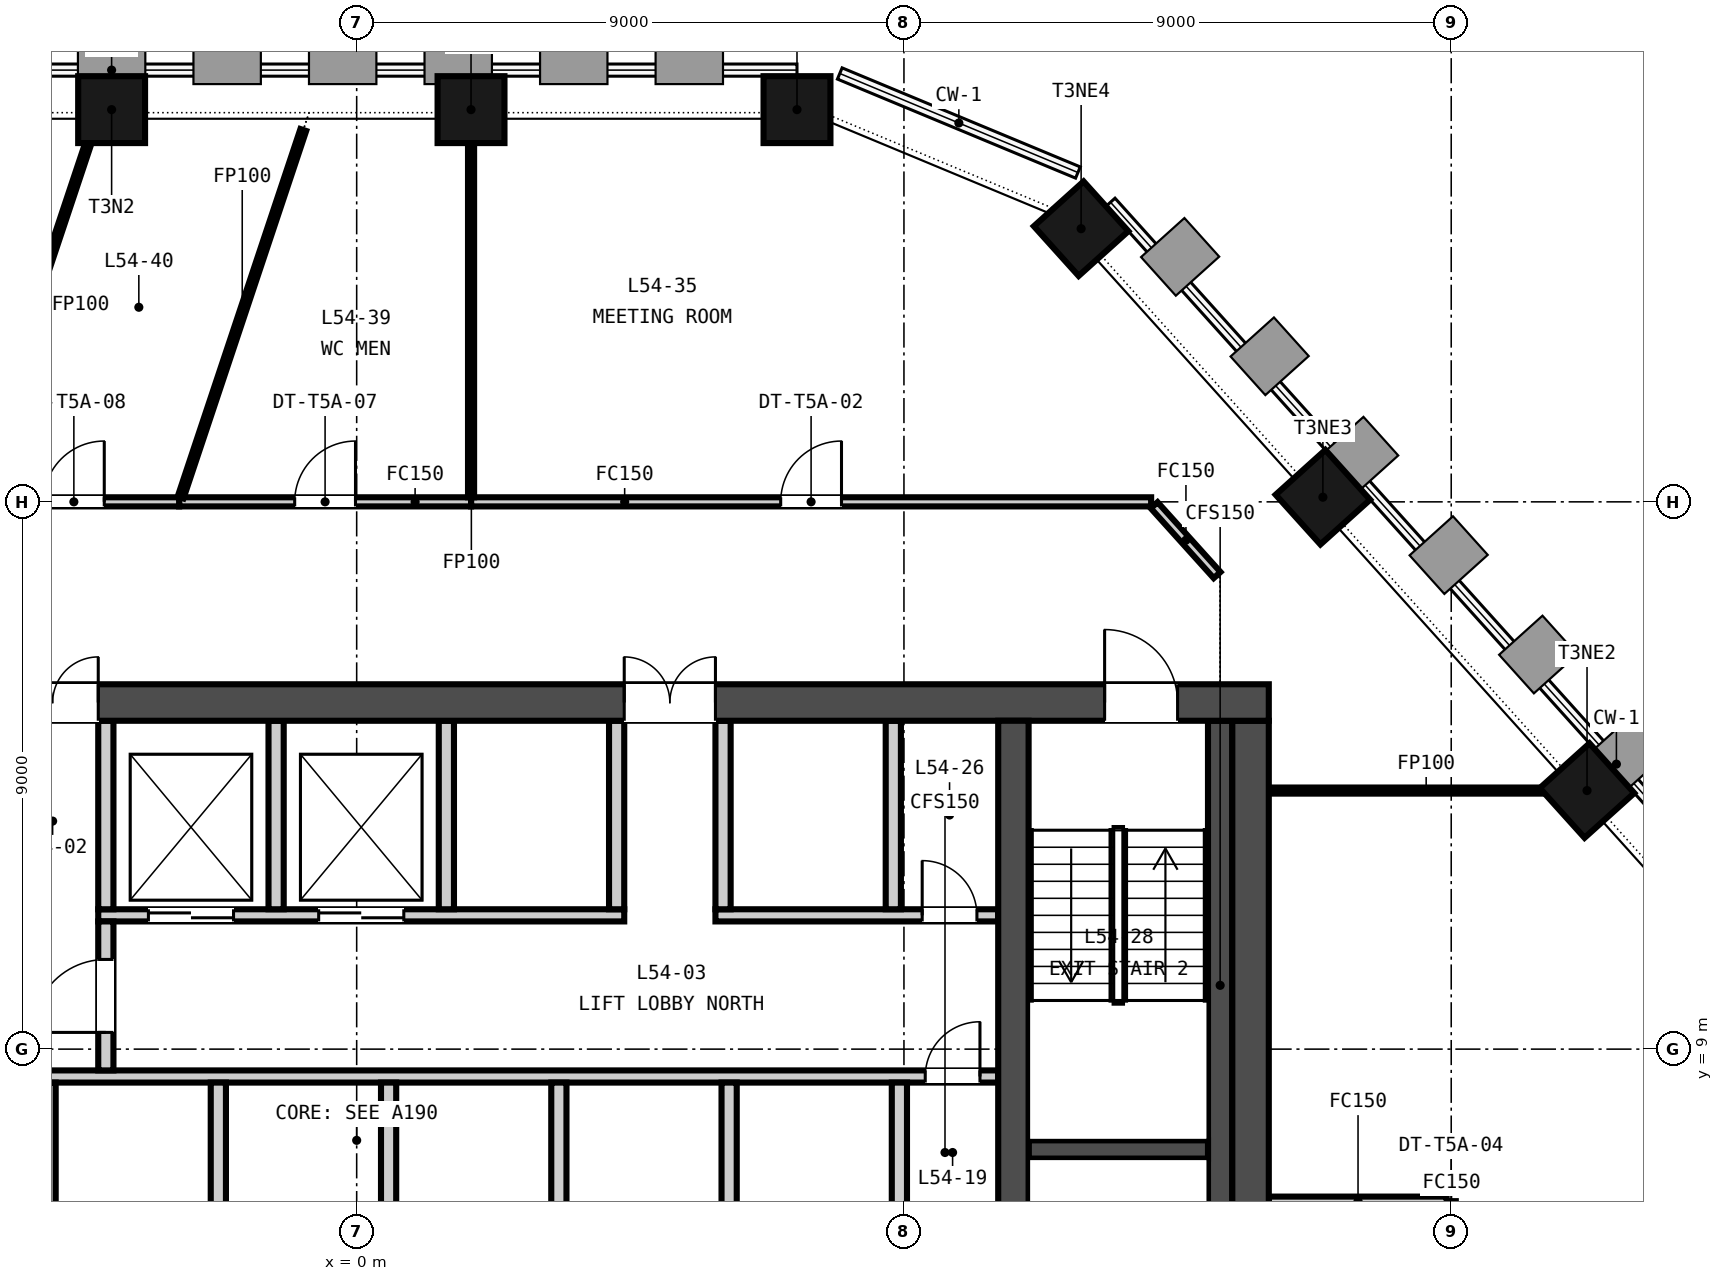
"""IFC4 building model, lengths in metres.
Left out: names, types, materials, properties, quantities, classifications, styles, units other than length and angle.
Written with IfcOpenShell. Run it as: python <this file> out.ifc"""

import sys

from ifc_helpers import new_model, si_unit, direction, frame, frame_2d, origin, origin_2d, place, context, subcontext, project, spatial, rectangle, extrude, element, fill, save


model = new_model("IFC4")
c1 = context("Model", 3, precision=1e-05, world=origin(), true_north=direction((0.0, 1.0)))
c2 = subcontext(c1, "Body", "Model", "MODEL_VIEW")
j1 = project(units=[si_unit("LENGTHUNIT", "METRE"), si_unit("PLANEANGLEUNIT", "RADIAN")], contexts=[c1])
p1 = place(None, origin())
s1 = spatial("IfcSite", under=j1, at=p1, CompositionType="ELEMENT")
p2 = place(p1, origin())
s2 = spatial("IfcBuilding", under=s1, at=p2, CompositionType="ELEMENT")
p3 = place(p2, frame((0.0, 0.0, 216.3)))
s3 = spatial("IfcBuildingStorey", under=s2, at=p3, CompositionType="ELEMENT", Elevation=216.3)
p4 = place(p3, frame((-15.0, 14.7, -0.15), z_axis=(0.0, 0.0, 1.0), x_axis=(1.0, 0.0, 0.0)))
e1 = element("IfcWall", 1, at=p4, inside=s3, PredefinedType="SOLIDWALL", context=c2, shape_type="SweptSolid", body=[
    extrude(rectangle(XDim=30.0, YDim=0.6, at=frame_2d((15.0, 0.0))), origin(), (0.0, 0.0, 1.0), 3.65),
])
p5 = place(p4, frame((9.25, 0.0, 0.15)))
e2 = element("IfcOpeningElement", 2, at=p5, cuts=e1, PredefinedType="OPENING", context=c2, shape_type="SweptSolid", body=[
    extrude(rectangle(XDim=1.5, YDim=2.1, at=frame_2d((0.75, 1.05))), frame((0.0, 0.31, 0.0), z_axis=(0.0, -1.0, 0.0), x_axis=(1.0, 0.0, 0.0)), (0.0, 0.0, 1.0), 0.62),
])
p6 = place(p4, frame((19.4, 0.0, 0.15)))
e3 = element("IfcOpeningElement", 3, at=p6, cuts=e1, PredefinedType="OPENING", context=c2, shape_type="SweptSolid", body=[
    extrude(rectangle(XDim=1.5, YDim=2.1, at=frame_2d((0.75, 1.05))), frame((0.0, 0.31, 0.0), z_axis=(0.0, -1.0, 0.0), x_axis=(1.0, 0.0, 0.0)), (0.0, 0.0, 1.0), 0.62),
])
p7 = place(p4, frame((1.5, 0.0, 0.15)))
e4 = element("IfcOpeningElement", 4, at=p7, cuts=e1, PredefinedType="OPENING", context=c2, shape_type="SweptSolid", body=[
    extrude(rectangle(XDim=1.2, YDim=2.1, at=frame_2d((0.6, 1.05))), frame((0.0, 0.31, 0.0), z_axis=(0.0, -1.0, 0.0), x_axis=(1.0, 0.0, 0.0)), (0.0, 0.0, 1.0), 0.62),
])
p8 = place(p4, frame((27.3, 0.0, 0.15)))
e5 = element("IfcOpeningElement", 5, at=p8, cuts=e1, PredefinedType="OPENING", context=c2, shape_type="SweptSolid", body=[
    extrude(rectangle(XDim=1.2, YDim=2.1, at=frame_2d((0.6, 1.05))), frame((0.0, 0.31, 0.0), z_axis=(0.0, -1.0, 0.0), x_axis=(1.0, 0.0, 0.0)), (0.0, 0.0, 1.0), 0.62),
])
p9 = place(p3, frame((14.7, 0.6, -0.15), z_axis=(0.0, 0.0, 1.0), x_axis=(0.0, 1.0, 0.0)))
e6 = element("IfcWall", 6, at=p9, inside=s3, PredefinedType="SOLIDWALL", context=c2, shape_type="SweptSolid", body=[
    extrude(rectangle(XDim=13.8, YDim=0.6, at=frame_2d((6.9, 0.0))), origin(), (0.0, 0.0, 1.0), 3.65),
])
p10 = place(p3, frame((10.8, 0.6, -0.15), z_axis=(0.0, 0.0, 1.0), x_axis=(0.0, 1.0, 0.0)))
e7 = element("IfcWall", 7, at=p10, inside=s3, PredefinedType="SOLIDWALL", context=c2, shape_type="SweptSolid", body=[
    extrude(rectangle(XDim=13.8, YDim=0.5, at=frame_2d((6.9, 0.0))), origin(), (0.0, 0.0, 1.0), 3.65),
])
for number, where, z_axis, x_axis in (
    (8, (7.241, 24.45, -0.15), (0.0, 0.0, 1.0), (-1.0, 0.0, 0.0)),
    (9, (1.881, 24.45, -0.15), (0.0, 0.0, 1.0), (-1.0, 0.0, 0.0)),
    (10, (-4.03, 24.45, -0.15), (0.0, 0.0, 1.0), (-1.0, 0.0, 0.0)),
    (11, (20.233, 13.252, -0.15), (0.0, 0.0, 1.0), (-0.669, 0.743, 0.0)),
    (12, (15.89, 18.076, -0.15), (0.0, 0.0, 1.0), (-0.669, 0.743, 0.0)),
    (13, (11.914, 22.492, -0.15), (0.0, 0.0, 1.0), (-0.669, 0.743, 0.0)),
):
    element("IfcColumn", number, at=place(p3, frame(where, z_axis=z_axis, x_axis=x_axis)), inside=s3, PredefinedType="COLUMN", context=c2, shape_type="SweptSolid", body=[
        extrude(rectangle(XDim=1.1, YDim=1.1, at=origin_2d()), origin(), (0.0, 0.0, 1.0), 3.65),
    ])
p11 = place(p3, frame((-10.55, 8.55, 0.0), z_axis=(0.0, 0.0, 1.0), x_axis=(1.0, 0.0, 0.0)))
e14 = element("IfcWall", 14, at=p11, inside=s3, PredefinedType="PARTITIONING", context=c2, shape_type="SweptSolid", body=[
    extrude(rectangle(XDim=21.1, YDim=0.2, at=frame_2d((10.55, 0.0))), origin(), (0.0, 0.0, 1.0), 3.5),
])
p12 = place(p11, frame((19.9, 0.0, 0.0)))
e15 = element("IfcOpeningElement", 15, at=p12, cuts=e14, PredefinedType="OPENING", context=c2, shape_type="SweptSolid", body=[
    extrude(rectangle(XDim=0.9, YDim=2.1, at=frame_2d((0.45, 1.05))), frame((0.0, 0.11, 0.0), z_axis=(0.0, -1.0, 0.0), x_axis=(1.0, 0.0, 0.0)), (0.0, 0.0, 1.0), 0.22),
])
p13 = place(p3, frame((-4.25, 11.2, 0.0), z_axis=(0.0, 0.0, 1.0), x_axis=(1.0, 0.0, 0.0)))
e16 = element("IfcWall", 16, at=p13, inside=s3, PredefinedType="PARTITIONING", context=c2, shape_type="SweptSolid", body=[
    extrude(rectangle(XDim=8.65, YDim=0.2, at=frame_2d((4.325, 0.0))), origin(), (0.0, 0.0, 1.0), 3.5),
])
p14 = place(p13, frame((0.825, 0.0, 0.0)))
e17 = element("IfcOpeningElement", 17, at=p14, cuts=e16, PredefinedType="OPENING", context=c2, shape_type="SweptSolid", body=[
    extrude(rectangle(XDim=1.4, YDim=2.1, at=frame_2d((0.7, 1.05))), frame((0.0, 0.11, 0.0), z_axis=(0.0, -1.0, 0.0), x_axis=(1.0, 0.0, 0.0)), (0.0, 0.0, 1.0), 0.22),
])
p15 = place(p13, frame((3.625, 0.0, 0.0)))
e18 = element("IfcOpeningElement", 18, at=p15, cuts=e16, PredefinedType="OPENING", context=c2, shape_type="SweptSolid", body=[
    extrude(rectangle(XDim=1.4, YDim=2.1, at=frame_2d((0.7, 1.05))), frame((0.0, 0.11, 0.0), z_axis=(0.0, -1.0, 0.0), x_axis=(1.0, 0.0, 0.0)), (0.0, 0.0, 1.0), 0.22),
])
p16 = place(p3, frame((5.9, 11.2, 0.0), z_axis=(0.0, 0.0, 1.0), x_axis=(1.0, 0.0, 0.0)))
e19 = element("IfcWall", 19, at=p16, inside=s3, PredefinedType="PARTITIONING", context=c2, shape_type="SweptSolid", body=[
    extrude(rectangle(XDim=4.65, YDim=0.2, at=frame_2d((2.325, 0.0))), origin(), (0.0, 0.0, 1.0), 3.5),
])
p17 = place(p16, frame((3.4, 0.0, 0.0)))
e20 = element("IfcOpeningElement", 20, at=p17, cuts=e19, PredefinedType="OPENING", context=c2, shape_type="SweptSolid", body=[
    extrude(rectangle(XDim=0.9, YDim=2.1, at=frame_2d((0.45, 1.05))), frame((0.0, 0.11, 0.0), z_axis=(0.0, -1.0, 0.0), x_axis=(1.0, 0.0, 0.0)), (0.0, 0.0, 1.0), 0.22),
])
p18 = place(p3, frame((-4.125, 8.65, 0.0), z_axis=(0.0, 0.0, 1.0), x_axis=(0.0, 1.0, 0.0)))
e21 = element("IfcWall", 21, at=p18, inside=s3, PredefinedType="PARTITIONING", context=c2, shape_type="SweptSolid", body=[
    extrude(rectangle(XDim=2.45, YDim=0.25, at=frame_2d((1.225, 0.0))), origin(), (0.0, 0.0, 1.0), 3.5),
])
p19 = place(p18, frame((0.625, 0.0, 0.0)))
e22 = element("IfcOpeningElement", 22, at=p19, cuts=e21, PredefinedType="OPENING", context=c2, shape_type="SweptSolid", body=[
    extrude(rectangle(XDim=1.2, YDim=2.1, at=frame_2d((0.6, 1.05))), frame((0.0, 0.135, 0.0), z_axis=(0.0, -1.0, 0.0), x_axis=(1.0, 0.0, 0.0)), (0.0, 0.0, 1.0), 0.27),
])
for number, where, z_axis, x_axis in (
    (23, (-5.075, 6.15, 0.0), (0.0, 0.0, 1.0), (0.0, 1.0, 0.0)),
    (24, (-2.275, 6.15, 0.0), (0.0, 0.0, 1.0), (0.0, 1.0, 0.0)),
    (25, (0.525, 6.15, 0.0), (0.0, 0.0, 1.0), (0.0, 1.0, 0.0)),
    (26, (3.325, 6.15, 0.0), (0.0, 0.0, 1.0), (0.0, 1.0, 0.0)),
    (27, (6.125, 6.15, 0.0), (0.0, 0.0, 1.0), (0.0, 1.0, 0.0)),
    (28, (8.925, 6.15, 0.0), (0.0, 0.0, 1.0), (0.0, 1.0, 0.0)),
):
    element("IfcWall", number, at=place(p3, frame(where, z_axis=z_axis, x_axis=x_axis)), inside=s3, PredefinedType="PARTITIONING", context=c2, shape_type="SweptSolid", body=[
        extrude(rectangle(XDim=2.3, YDim=0.25, at=frame_2d((1.15, 0.0))), origin(), (0.0, 0.0, 1.0), 3.5),
    ])
for number, where, z_axis, x_axis in (
    (29, (-4.125, 11.3, 0.0), (0.0, 0.0, 1.0), (0.0, 1.0, 0.0)),
    (30, (-1.325, 11.3, 0.0), (0.0, 0.0, 1.0), (0.0, 1.0, 0.0)),
    (31, (1.475, 11.3, 0.0), (0.0, 0.0, 1.0), (0.0, 1.0, 0.0)),
    (32, (4.275, 11.3, 0.0), (0.0, 0.0, 1.0), (0.0, 1.0, 0.0)),
    (33, (6.025, 11.3, 0.0), (0.0, 0.0, 1.0), (0.0, 1.0, 0.0)),
    (34, (8.825, 11.3, 0.0), (0.0, 0.0, 1.0), (0.0, 1.0, 0.0)),
):
    element("IfcWall", number, at=place(p3, frame(where, z_axis=z_axis, x_axis=x_axis)), inside=s3, PredefinedType="PARTITIONING", context=c2, shape_type="SweptSolid", body=[
        extrude(rectangle(XDim=3.1, YDim=0.25, at=frame_2d((1.55, 0.0))), origin(), (0.0, 0.0, 1.0), 3.5),
    ])
p20 = place(p3, frame((11.05, 7.35, 0.0), z_axis=(0.0, 0.0, 1.0), x_axis=(1.0, 0.0, 0.0)))
e35 = element("IfcWall", 35, at=p20, inside=s3, PredefinedType="SOLIDWALL", context=c2, shape_type="SweptSolid", body=[
    extrude(rectangle(XDim=2.95, YDim=0.3, at=frame_2d((1.475, 0.0))), origin(), (0.0, 0.0, 1.0), 3.5),
])
p21 = place(p3, frame((14.2, 0.6, 0.0), z_axis=(0.0, 0.0, 1.0), x_axis=(0.0, 1.0, 0.0)))
e36 = element("IfcWall", 36, at=p21, inside=s3, PredefinedType="SOLIDWALL", context=c2, shape_type="SweptSolid", body=[
    extrude(rectangle(XDim=13.8, YDim=0.4, at=frame_2d((6.9, 0.0))), origin(), (0.0, 0.0, 1.0), 3.5),
])
p22 = place(p3, frame((1.881, 18.0, 0.0), z_axis=(0.0, 0.0, 1.0), x_axis=(1.0, 0.0, 0.0)))
e37 = element("IfcWall", 37, at=p22, inside=s3, PredefinedType="PARTITIONING", context=c2, shape_type="SweptSolid", body=[
    extrude(rectangle(XDim=11.184, YDim=0.15, at=frame_2d((5.592, 0.0))), origin(), (0.0, 0.0, 1.0), 2.751),
])
p23 = place(p22, frame((5.092, 0.0, 0.0)))
e38 = element("IfcOpeningElement", 38, at=p23, cuts=e37, PredefinedType="OPENING", context=c2, shape_type="SweptSolid", body=[
    extrude(rectangle(XDim=1.0, YDim=2.1, at=frame_2d((0.5, 1.05))), frame((0.0, 0.085, 0.0), z_axis=(0.0, -1.0, 0.0), x_axis=(1.0, 0.0, 0.0)), (0.0, 0.0, 1.0), 0.17),
])
p24 = place(p3, frame((13.115, 17.944, 0.0), z_axis=(0.0, 0.0, 1.0), x_axis=(0.669270047653, -0.74301924828, 0.0)))
e39 = element("IfcWall", 39, at=p24, inside=s3, PredefinedType="PARTITIONING", context=c2, shape_type="SweptSolid", body=[
    extrude(rectangle(XDim=1.546, YDim=0.15, at=frame_2d((0.773, 0.0))), origin(), (0.0, 0.0, 1.0), 2.751),
])
p25 = place(p3, frame((15.0, 13.252, 0.0), z_axis=(0.0, 0.0, 1.0), x_axis=(1.0, 0.0, 0.0)))
e40 = element("IfcWall", 40, at=p25, inside=s3, PredefinedType="PARTITIONING", context=c2, shape_type="SweptSolid", body=[
    extrude(rectangle(XDim=5.166, YDim=0.1, at=frame_2d((2.583, 0.0))), origin(), (0.0, 0.0, 1.0), 2.751),
])
p26 = place(p3, frame((15.0, 6.5, 0.0), z_axis=(0.0, 0.0, 1.0), x_axis=(1.0, 0.0, 0.0)))
e41 = element("IfcWall", 41, at=p26, inside=s3, PredefinedType="PARTITIONING", context=c2, shape_type="SweptSolid", body=[
    extrude(rectangle(XDim=2.925, YDim=0.15, at=frame_2d((1.462, 0.0))), origin(), (0.0, 0.0, 1.0), 2.751),
])
p27 = place(p3, frame((-2.92, 18.0, 0.0), z_axis=(0.0, 0.0, 1.0), x_axis=(1.0, 0.0, 0.0)))
e42 = element("IfcWall", 42, at=p27, inside=s3, PredefinedType="PARTITIONING", context=c2, shape_type="SweptSolid", body=[
    extrude(rectangle(XDim=4.801, YDim=0.15, at=frame_2d((2.4, 0.0))), origin(), (0.0, 0.0, 1.0), 2.751),
])
p28 = place(p27, frame((1.9, 0.0, 0.0)))
e43 = element("IfcOpeningElement", 43, at=p28, cuts=e42, PredefinedType="OPENING", context=c2, shape_type="SweptSolid", body=[
    extrude(rectangle(XDim=1.0, YDim=2.1, at=frame_2d((0.5, 1.05))), frame((0.0, 0.085, 0.0), z_axis=(0.0, -1.0, 0.0), x_axis=(1.0, 0.0, 0.0)), (0.0, 0.0, 1.0), 0.17),
])
p29 = place(p3, frame((1.881, 18.075, 0.0), z_axis=(0.0, 0.0, 1.0), x_axis=(0.0, 1.0, 0.0)))
e44 = element("IfcWall", 44, at=p29, inside=s3, PredefinedType="PARTITIONING", context=c2, shape_type="SweptSolid", body=[
    extrude(rectangle(XDim=6.325, YDim=0.1, at=frame_2d((3.163, 0.0))), origin(), (0.0, 0.0, 1.0), 2.751),
])
p30 = place(p3, frame((-6.382, 18.0, 0.0), z_axis=(0.0, 0.0, 1.0), x_axis=(1.0, 0.0, 0.0)))
e45 = element("IfcWall", 45, at=p30, inside=s3, PredefinedType="PARTITIONING", context=c2, shape_type="SweptSolid", body=[
    extrude(rectangle(XDim=3.462, YDim=0.15, at=frame_2d((1.731, 0.0))), origin(), (0.0, 0.0, 1.0), 2.751),
])
p31 = place(p30, frame((1.231, 0.0, 0.0)))
e46 = element("IfcOpeningElement", 46, at=p31, cuts=e45, PredefinedType="OPENING", context=c2, shape_type="SweptSolid", body=[
    extrude(rectangle(XDim=1.0, YDim=2.1, at=frame_2d((0.5, 1.05))), frame((0.0, 0.085, 0.0), z_axis=(0.0, -1.0, 0.0), x_axis=(1.0, 0.0, 0.0)), (0.0, 0.0, 1.0), 0.17),
])
p32 = place(p3, frame((-2.896, 18.071, 0.0), z_axis=(0.0, 0.0, 1.0), x_axis=(0.316721942661, 0.948518429466, 0.0)))
e47 = element("IfcWall", 47, at=p32, inside=s3, PredefinedType="PARTITIONING", context=c2, shape_type="SweptSolid", body=[
    extrude(rectangle(XDim=6.373, YDim=0.1, at=frame_2d((3.186, 0.0))), origin(), (0.0, 0.0, 1.0), 2.751),
])
p33 = place(p3, frame((-6.358, 18.071, 0.0), z_axis=(0.0, 0.0, 1.0), x_axis=(0.316688766046, 0.9485295069, 0.0)))
e48 = element("IfcWall", 48, at=p33, inside=s3, PredefinedType="PARTITIONING", context=c2, shape_type="SweptSolid", body=[
    extrude(rectangle(XDim=6.672, YDim=0.1, at=frame_2d((3.336, 0.0))), origin(), (0.0, 0.0, 1.0), 2.751),
])
p34 = place(p19, origin())
e49 = element("IfcDoor", 49, at=p34, inside=s3, OperationType="SINGLE_SWING_LEFT", PredefinedType="DOOR", context=c2, shape_type="SweptSolid", body=[
    extrude(rectangle(XDim=1.2, YDim=2.1, at=frame_2d((0.6, 1.05))), frame((0.0, 0.025, 0.0), z_axis=(0.0, -1.0, 0.0), x_axis=(1.0, 0.0, 0.0)), (0.0, 0.0, 1.0), 0.05),
])
fill(e22, e49)
p35 = place(p12, origin())
e50 = element("IfcDoor", 50, at=p35, inside=s3, OperationType="SINGLE_SWING_RIGHT", PredefinedType="DOOR", context=c2, shape_type="SweptSolid", body=[
    extrude(rectangle(XDim=0.9, YDim=2.1, at=frame_2d((0.45, 1.05))), frame((0.0, 0.025, 0.0), z_axis=(0.0, -1.0, 0.0), x_axis=(1.0, 0.0, 0.0)), (0.0, 0.0, 1.0), 0.05),
])
fill(e15, e50)
p36 = place(p14, origin())
e51 = element("IfcDoor", 51, at=p36, inside=s3, OperationType="DOUBLE_DOOR_SLIDING", PredefinedType="DOOR", context=c2, shape_type="SweptSolid", body=[
    extrude(rectangle(XDim=1.4, YDim=2.1, at=frame_2d((0.7, 1.05))), frame((0.0, 0.025, 0.0), z_axis=(0.0, -1.0, 0.0), x_axis=(1.0, 0.0, 0.0)), (0.0, 0.0, 1.0), 0.05),
])
fill(e17, e51)
p37 = place(p15, origin())
e52 = element("IfcDoor", 52, at=p37, inside=s3, OperationType="DOUBLE_DOOR_SLIDING", PredefinedType="DOOR", context=c2, shape_type="SweptSolid", body=[
    extrude(rectangle(XDim=1.4, YDim=2.1, at=frame_2d((0.7, 1.05))), frame((0.0, 0.025, 0.0), z_axis=(0.0, -1.0, 0.0), x_axis=(1.0, 0.0, 0.0)), (0.0, 0.0, 1.0), 0.05),
])
fill(e18, e52)
p38 = place(p17, origin())
e53 = element("IfcDoor", 53, at=p38, inside=s3, OperationType="SINGLE_SWING_LEFT", PredefinedType="DOOR", context=c2, shape_type="SweptSolid", body=[
    extrude(rectangle(XDim=0.9, YDim=2.1, at=frame_2d((0.45, 1.05))), frame((0.0, 0.025, 0.0), z_axis=(0.0, -1.0, 0.0), x_axis=(1.0, 0.0, 0.0)), (0.0, 0.0, 1.0), 0.05),
])
fill(e20, e53)
p39 = place(p5, origin())
e54 = element("IfcDoor", 54, at=p39, inside=s3, OperationType="DOUBLE_DOOR_SINGLE_SWING", PredefinedType="DOOR", context=c2, shape_type="SweptSolid", body=[
    extrude(rectangle(XDim=1.5, YDim=2.1, at=frame_2d((0.75, 1.05))), frame((0.0, 0.025, 0.0), z_axis=(0.0, -1.0, 0.0), x_axis=(1.0, 0.0, 0.0)), (0.0, 0.0, 1.0), 0.05),
])
fill(e2, e54)
p40 = place(p6, origin())
e55 = element("IfcDoor", 55, at=p40, inside=s3, OperationType="DOUBLE_DOOR_SINGLE_SWING", PredefinedType="DOOR", context=c2, shape_type="SweptSolid", body=[
    extrude(rectangle(XDim=1.5, YDim=2.1, at=frame_2d((0.75, 1.05))), frame((0.0, 0.025, 0.0), z_axis=(0.0, -1.0, 0.0), x_axis=(1.0, 0.0, 0.0)), (0.0, 0.0, 1.0), 0.05),
])
fill(e3, e55)
p41 = place(p8, origin())
e56 = element("IfcDoor", 56, at=p41, inside=s3, OperationType="SINGLE_SWING_LEFT", PredefinedType="DOOR", context=c2, shape_type="SweptSolid", body=[
    extrude(rectangle(XDim=1.2, YDim=2.1, at=frame_2d((0.6, 1.05))), frame((0.0, 0.025, 0.0), z_axis=(0.0, -1.0, 0.0), x_axis=(1.0, 0.0, 0.0)), (0.0, 0.0, 1.0), 0.05),
])
fill(e5, e56)
p42 = place(p23, origin())
e57 = element("IfcDoor", 57, at=p42, inside=s3, OperationType="SINGLE_SWING_RIGHT", PredefinedType="DOOR", context=c2, shape_type="SweptSolid", body=[
    extrude(rectangle(XDim=1.0, YDim=2.1, at=frame_2d((0.5, 1.05))), frame((0.0, 0.025, 0.0), z_axis=(0.0, -1.0, 0.0), x_axis=(1.0, 0.0, 0.0)), (0.0, 0.0, 1.0), 0.05),
])
fill(e38, e57)
p43 = place(p28, origin())
e58 = element("IfcDoor", 58, at=p43, inside=s3, OperationType="SINGLE_SWING_RIGHT", PredefinedType="DOOR", context=c2, shape_type="SweptSolid", body=[
    extrude(rectangle(XDim=1.0, YDim=2.1, at=frame_2d((0.5, 1.05))), frame((0.0, 0.025, 0.0), z_axis=(0.0, -1.0, 0.0), x_axis=(1.0, 0.0, 0.0)), (0.0, 0.0, 1.0), 0.05),
])
fill(e43, e58)
p44 = place(p31, origin())
e59 = element("IfcDoor", 59, at=p44, inside=s3, OperationType="SINGLE_SWING_RIGHT", PredefinedType="DOOR", context=c2, shape_type="SweptSolid", body=[
    extrude(rectangle(XDim=1.0, YDim=2.1, at=frame_2d((0.5, 1.05))), frame((0.0, 0.025, 0.0), z_axis=(0.0, -1.0, 0.0), x_axis=(1.0, 0.0, 0.0)), (0.0, 0.0, 1.0), 0.05),
])
fill(e46, e59)
save(model, sys.argv[1])
